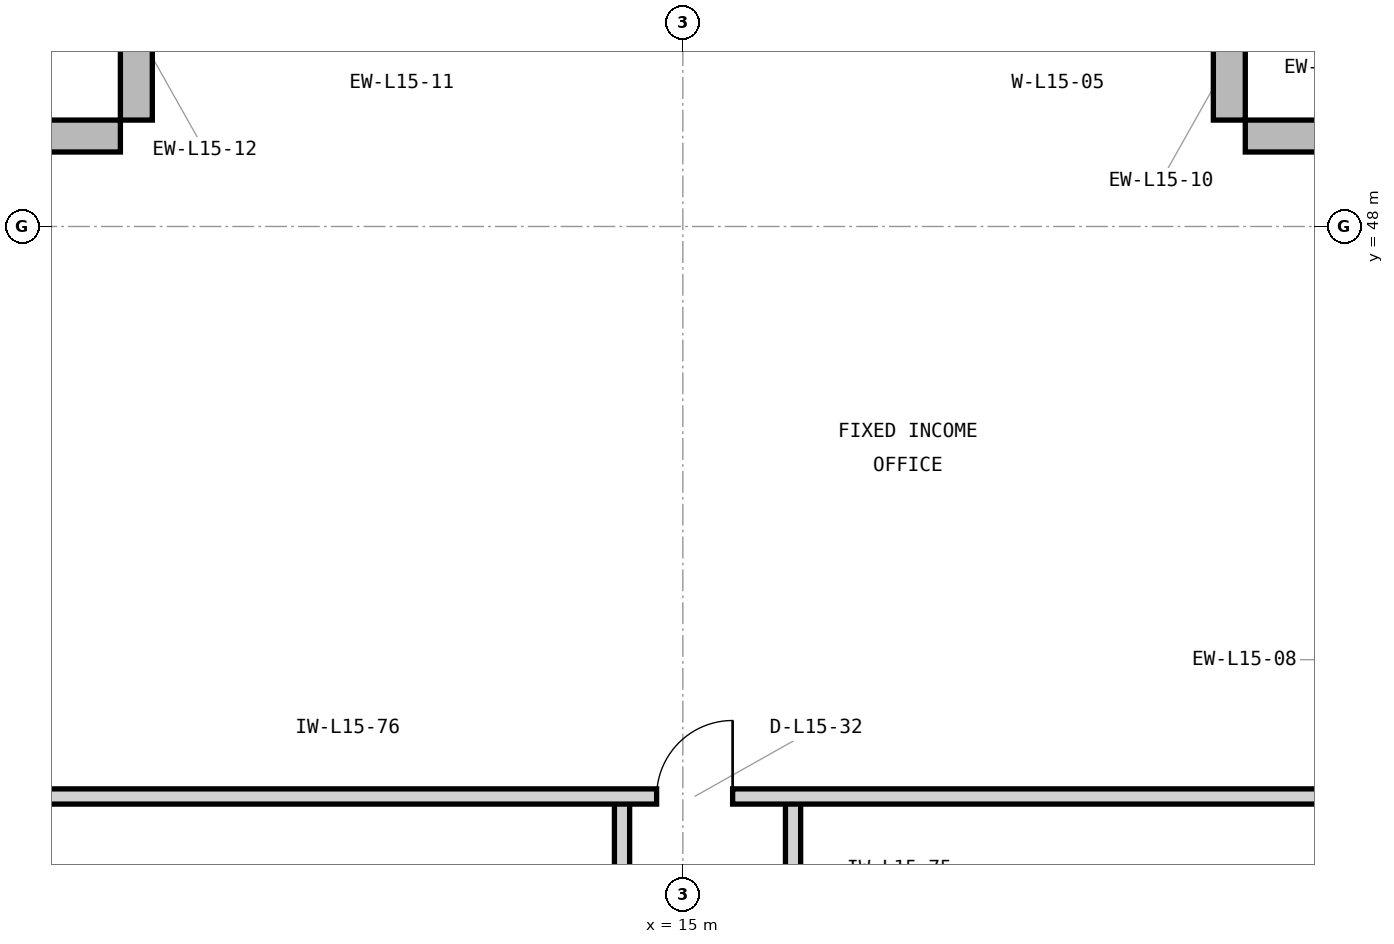
"""IFC4 building model, lengths in metres.
Left out: names, types, materials, properties, quantities, classifications, styles, units other than length and angle.
Written with IfcOpenShell. Run it as: python <this file> out.ifc"""

import sys

from ifc_helpers import new_model, si_unit, direction, frame, frame_2d, origin, place, context, subcontext, project, spatial, rectangle, extrude, element, fill, save


model = new_model("IFC4")
c1 = context("Model", 3, precision=1e-05, world=origin(), true_north=direction((0.0, 1.0)))
c2 = subcontext(c1, "Body", "Model", "MODEL_VIEW")
j1 = project(units=[si_unit("LENGTHUNIT", "METRE"), si_unit("PLANEANGLEUNIT", "RADIAN")], contexts=[c1])
p1 = place(None, origin())
s1 = spatial("IfcSite", under=j1, at=p1, CompositionType="ELEMENT")
p2 = place(p1, origin())
s2 = spatial("IfcBuilding", under=s1, at=p2, CompositionType="ELEMENT")
p3 = place(p2, frame((0.0, 0.0, 67.8)))
s3 = spatial("IfcBuildingStorey", under=s2, at=p3, CompositionType="ELEMENT", Elevation=67.8)
for number, where, z_axis, x_axis in (
    (1, (24.0, 49.19, 0.0), (0.0, 0.0, 1.0), (-1.0, 0.0, 0.0)),
    (2, (22.19, 49.4, 0.0), (0.0, 0.0, 1.0), (0.0, 1.0, 0.0)),
    (3, (7.81, 51.0, 0.0), (0.0, 0.0, 1.0), (0.0, -1.0, 0.0)),
    (4, (7.6, 49.19, 0.0), (0.0, 0.0, 1.0), (-1.0, 0.0, 0.0)),
):
    element("IfcWall", number, at=place(p3, frame(where, z_axis=z_axis, x_axis=x_axis)), inside=s3, PredefinedType="STANDARD", context=c2, shape_type="SweptSolid", body=[
        extrude(rectangle(XDim=1.6, YDim=0.42, at=frame_2d((0.8, 0.0))), origin(), (0.0, 0.0, 1.0), 3.98),
    ])
p4 = place(p3, frame((14.2, 29.18, 0.0), z_axis=(0.0, 0.0, 1.0), x_axis=(0.0, 1.0, 0.0)))
e5 = element("IfcWall", 5, at=p4, inside=s3, PredefinedType="PARTITIONING", context=c2, shape_type="SweptSolid", body=[
    extrude(rectangle(XDim=11.32, YDim=0.2, at=frame_2d((5.66, 0.0))), origin(), (0.0, 0.0, 1.0), 3.97),
])
p5 = place(p4, frame((5.16, 0.0, 0.0)))
e6 = element("IfcOpeningElement", 6, at=p5, cuts=e5, PredefinedType="OPENING", context=c2, shape_type="SweptSolid", body=[
    extrude(rectangle(XDim=1.0, YDim=2.15, at=frame_2d((0.5, 1.075))), frame((0.0, 0.11, 0.0), z_axis=(0.0, -1.0, 0.0), x_axis=(1.0, 0.0, 0.0)), (0.0, 0.0, 1.0), 0.22),
])
p6 = place(p3, frame((16.45, 36.68, 0.0), z_axis=(0.0, 0.0, 1.0), x_axis=(0.0, 1.0, 0.0)))
e7 = element("IfcWall", 7, at=p6, inside=s3, PredefinedType="PARTITIONING", context=c2, shape_type="SweptSolid", body=[
    extrude(rectangle(XDim=3.82, YDim=0.2, at=frame_2d((1.91, 0.0))), origin(), (0.0, 0.0, 1.0), 3.97),
])
p7 = place(p6, frame((1.41, 0.0, 0.0)))
e8 = element("IfcOpeningElement", 8, at=p7, cuts=e7, PredefinedType="OPENING", context=c2, shape_type="SweptSolid", body=[
    extrude(rectangle(XDim=1.0, YDim=2.15, at=frame_2d((0.5, 1.075))), frame((0.0, 0.11, 0.0), z_axis=(0.0, -1.0, 0.0), x_axis=(1.0, 0.0, 0.0)), (0.0, 0.0, 1.0), 0.22),
])
p8 = place(p3, frame((6.18, 40.5, 0.0), z_axis=(0.0, 0.0, 1.0), x_axis=(1.0, 0.0, 0.0)))
e9 = element("IfcWall", 9, at=p8, inside=s3, PredefinedType="PARTITIONING", context=c2, shape_type="SweptSolid", body=[
    extrude(rectangle(XDim=17.64, YDim=0.2, at=frame_2d((8.82, 0.0))), origin(), (0.0, 0.0, 1.0), 3.97),
])
p9 = place(p8, frame((8.475, 0.0, 0.0)))
e10 = element("IfcOpeningElement", 10, at=p9, cuts=e9, PredefinedType="OPENING", context=c2, shape_type="SweptSolid", body=[
    extrude(rectangle(XDim=1.0, YDim=2.15, at=frame_2d((0.5, 1.075))), frame((0.0, 0.11, 0.0), z_axis=(0.0, -1.0, 0.0), x_axis=(1.0, 0.0, 0.0)), (0.0, 0.0, 1.0), 0.22),
])
p10 = place(p9, origin())
e11 = element("IfcDoor", 11, at=p10, inside=s3, OperationType="SINGLE_SWING_RIGHT", PredefinedType="DOOR", context=c2, shape_type="SweptSolid", body=[
    extrude(rectangle(XDim=1.0, YDim=2.15, at=frame_2d((0.5, 1.075))), frame((0.0, 0.025, 0.0), z_axis=(0.0, -1.0, 0.0), x_axis=(1.0, 0.0, 0.0)), (0.0, 0.0, 1.0), 0.05),
])
fill(e10, e11)
save(model, sys.argv[1])
